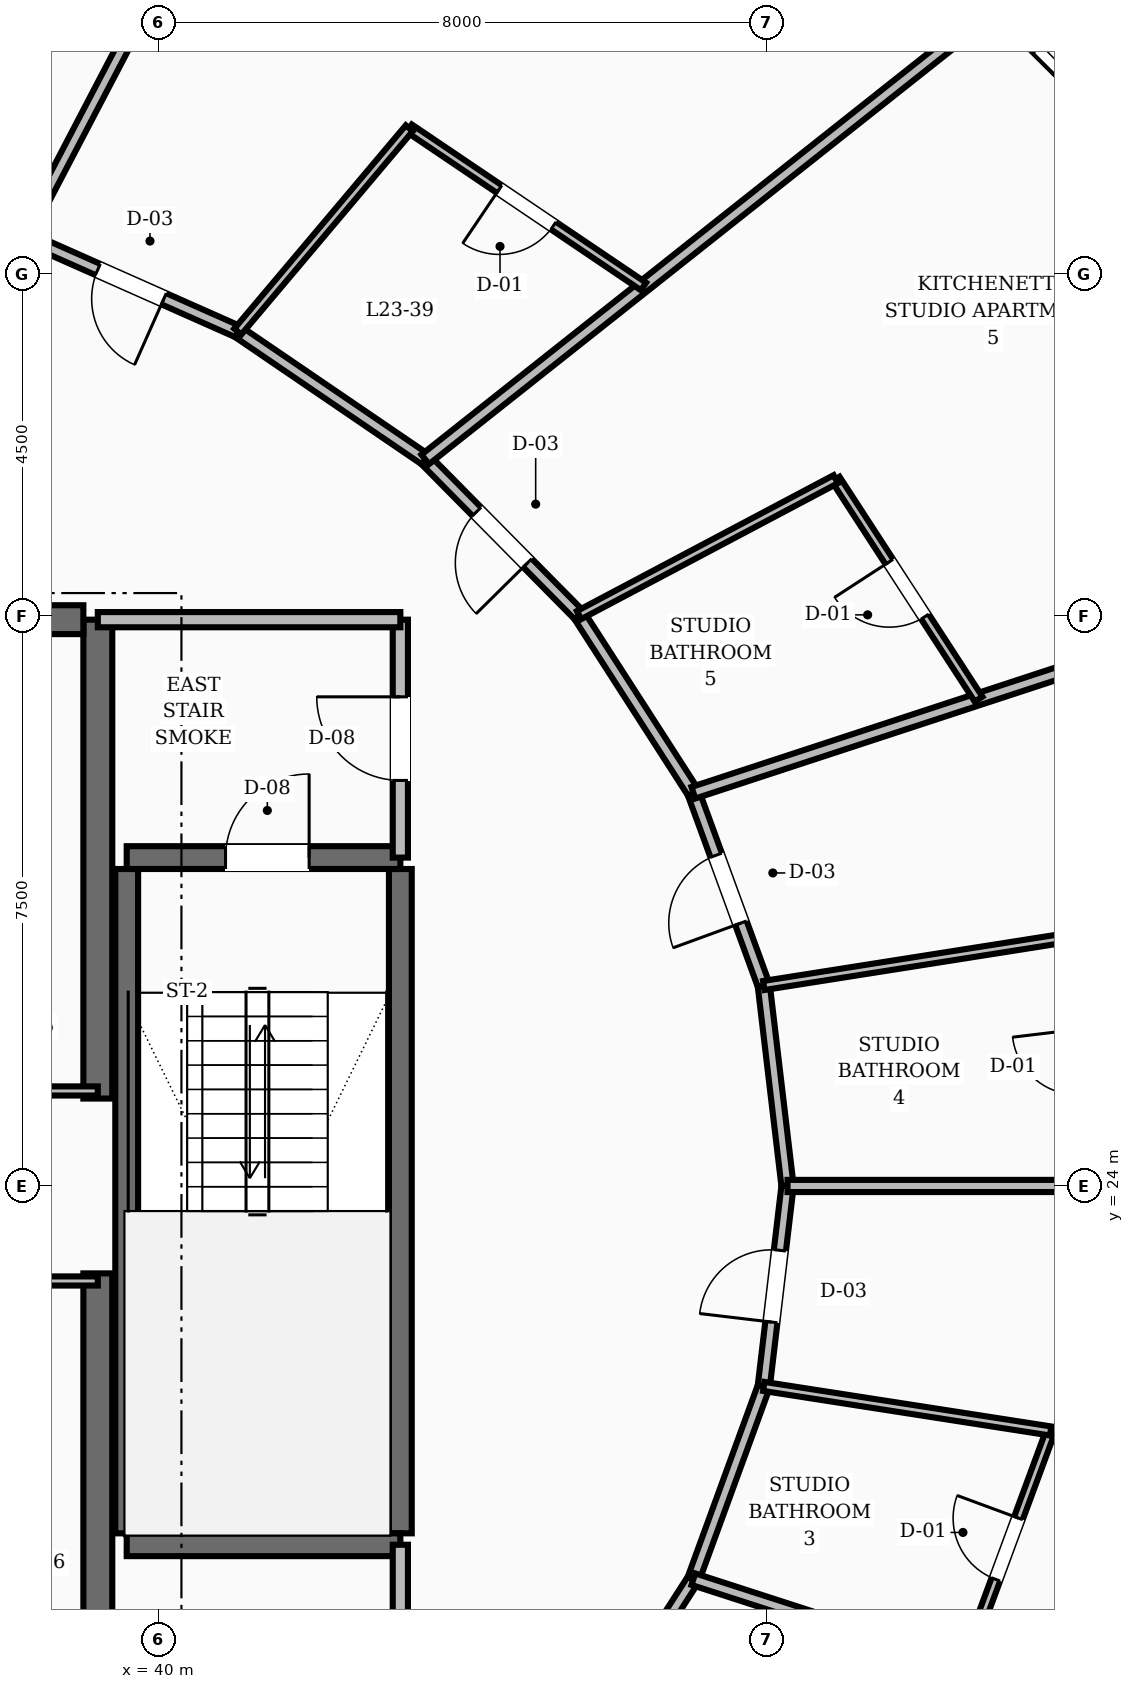
"""IFC4 building model, lengths in metres.
Left out: names, types, materials, properties, quantities, classifications, styles, units other than length and angle.
Written with IfcOpenShell. Run it as: python <this file> out.ifc"""

import sys

from ifc_helpers import new_model, si_unit, direction, frame, frame_2d, origin, place, context, subcontext, project, spatial, rectangle, extrude, element, fill, save


model = new_model("IFC4")
c1 = context("Model", 3, precision=1e-05, world=origin(), true_north=direction((0.0, 1.0)))
c2 = subcontext(c1, "Body", "Model", "MODEL_VIEW")
j1 = project(units=[si_unit("LENGTHUNIT", "METRE"), si_unit("PLANEANGLEUNIT", "RADIAN")], contexts=[c1])
p1 = place(None, origin())
s1 = spatial("IfcSite", under=j1, at=p1, CompositionType="ELEMENT")
p2 = place(p1, origin())
s2 = spatial("IfcBuilding", under=s1, at=p2, CompositionType="ELEMENT")
p3 = place(p2, frame((0.0, 0.0, 91.6)))
s3 = spatial("IfcBuildingStorey", under=s2, at=p3, CompositionType="ELEMENT", Elevation=91.6)
for number, where, z_axis, x_axis in (
    (1, (39.2, 16.55, 0.0), (0.0, 0.0, 1.0), (0.0, 1.0, 0.0)),
    (2, (39.2, 25.15, 0.0), (0.0, 0.0, 1.0), (0.0, 1.0, 0.0)),
):
    element("IfcWall", number, at=place(p3, frame(where, z_axis=z_axis, x_axis=x_axis)), inside=s3, PredefinedType="SHEAR", context=c2, shape_type="SweptSolid", body=[
        extrude(rectangle(XDim=6.3, YDim=0.38, at=frame_2d((3.15, 0.0))), origin(), (0.0, 0.0, 1.0), 3.6),
    ])
p4 = place(p3, frame((35.8, 31.45, 0.0), z_axis=(0.0, 0.0, 1.0), x_axis=(1.0, 0.0, 0.0)))
e3 = element("IfcWall", 3, at=p4, inside=s3, PredefinedType="SHEAR", context=c2, shape_type="SweptSolid", body=[
    extrude(rectangle(XDim=3.21, YDim=0.38, at=frame_2d((1.605, 0.0))), origin(), (0.0, 0.0, 1.0), 3.6),
])
p5 = place(p4, frame((0.3, 0.0, 0.0)))
e4 = element("IfcOpeningElement", 4, at=p5, cuts=e3, PredefinedType="OPENING", context=c2, shape_type="SweptSolid", body=[
    extrude(rectangle(XDim=1.1, YDim=2.1, at=frame_2d((0.55, 1.05))), frame((0.0, 0.2, 0.0), z_axis=(0.0, -1.0, 0.0), x_axis=(1.0, 0.0, 0.0)), (0.0, 0.0, 1.0), 0.4),
])
for number, where, z_axis, x_axis in (
    (5, (43.18, 19.43, 0.0), (0.0, 0.0, 1.0), (0.0, 1.0, 0.0)),
    (6, (39.58, 19.43, 0.0), (0.0, 0.0, 1.0), (0.0, 1.0, 0.0)),
):
    element("IfcWall", number, at=place(p3, frame(where, z_axis=z_axis, x_axis=x_axis)), inside=s3, PredefinedType="SHEAR", context=c2, shape_type="SweptSolid", body=[
        extrude(rectangle(XDim=8.74, YDim=0.3, at=frame_2d((4.37, 0.0))), origin(), (0.0, 0.0, 1.0), 3.6),
    ])
p6 = place(p3, frame((39.58, 19.28, 0.0), z_axis=(0.0, 0.0, 1.0), x_axis=(1.0, 0.0, 0.0)))
e7 = element("IfcWall", 7, at=p6, inside=s3, PredefinedType="SHEAR", context=c2, shape_type="SweptSolid", body=[
    extrude(rectangle(XDim=3.6, YDim=0.3, at=frame_2d((1.8, 0.0))), origin(), (0.0, 0.0, 1.0), 3.6),
])
p7 = place(p3, frame((39.58, 28.32, 0.0), z_axis=(0.0, 0.0, 1.0), x_axis=(1.0, 0.0, 0.0)))
e8 = element("IfcWall", 8, at=p7, inside=s3, PredefinedType="SHEAR", context=c2, shape_type="SweptSolid", body=[
    extrude(rectangle(XDim=3.6, YDim=0.3, at=frame_2d((1.8, 0.0))), origin(), (0.0, 0.0, 1.0), 3.6),
])
p8 = place(p7, frame((1.3, 0.0, 0.0)))
e9 = element("IfcOpeningElement", 9, at=p8, cuts=e8, PredefinedType="OPENING", context=c2, shape_type="SweptSolid", body=[
    extrude(rectangle(XDim=1.1, YDim=2.1, at=frame_2d((0.55, 1.05))), frame((0.0, 0.16, 0.0), z_axis=(0.0, -1.0, 0.0), x_axis=(1.0, 0.0, 0.0)), (0.0, 0.0, 1.0), 0.32),
])
p9 = place(p3, frame((54.418, 36.214, 0.0), z_axis=(0.0, 0.0, 1.0), x_axis=(-0.709375776042, 0.704830482006, 0.0)))
e10 = element("IfcWall", 10, at=p9, inside=s3, PredefinedType="STANDARD", context=c2, shape_type="SweptSolid", body=[
    extrude(rectangle(XDim=4.727, YDim=0.28, at=frame_2d((2.363, 0.0))), origin(), (0.0, 0.0, 1.0), 2.71),
])
p10 = place(p9, frame((0.763, 0.0, 0.8)))
e11 = element("IfcOpeningElement", 11, at=p10, cuts=e10, PredefinedType="OPENING", context=c2, shape_type="SweptSolid", body=[
    extrude(rectangle(XDim=3.2, YDim=1.65, at=frame_2d((1.6, 0.825))), frame((0.0, 0.15, 0.0), z_axis=(0.0, -1.0, 0.0), x_axis=(1.0, 0.0, 0.0)), (0.0, 0.0, 1.0), 0.3),
])
p11 = place(p3, frame((43.18, 28.32, 0.0), z_axis=(0.0, 0.0, 1.0), x_axis=(0.0, 1.0, 0.0)))
e12 = element("IfcWall", 12, at=p11, inside=s3, PredefinedType="SOLIDWALL", context=c2, shape_type="SweptSolid", body=[
    extrude(rectangle(XDim=3.13, YDim=0.2, at=frame_2d((1.565, 0.0))), origin(), (0.0, 0.0, 1.0), 2.71),
])
p12 = place(p11, frame((1.015, 0.0, 0.0)))
e13 = element("IfcOpeningElement", 13, at=p12, cuts=e12, PredefinedType="OPENING", context=c2, shape_type="SweptSolid", body=[
    extrude(rectangle(XDim=1.1, YDim=2.1, at=frame_2d((0.55, 1.05))), frame((0.0, 0.11, 0.0), z_axis=(0.0, -1.0, 0.0), x_axis=(1.0, 0.0, 0.0)), (0.0, 0.0, 1.0), 0.22),
])
p13 = place(p3, frame((39.2, 31.45, 0.0), z_axis=(0.0, 0.0, 1.0), x_axis=(1.0, 0.0, 0.0)))
e14 = element("IfcWall", 14, at=p13, inside=s3, PredefinedType="SOLIDWALL", context=c2, shape_type="SweptSolid", body=[
    extrude(rectangle(XDim=3.98, YDim=0.2, at=frame_2d((1.99, 0.0))), origin(), (0.0, 0.0, 1.0), 2.71),
])
p14 = place(p3, frame((43.18, 16.55, 0.0), z_axis=(0.0, 0.0, 1.0), x_axis=(0.0, 1.0, 0.0)))
e15 = element("IfcWall", 15, at=p14, inside=s3, PredefinedType="SOLIDWALL", context=c2, shape_type="SweptSolid", body=[
    extrude(rectangle(XDim=2.73, YDim=0.2, at=frame_2d((1.365, 0.0))), origin(), (0.0, 0.0, 1.0), 2.71),
])
p15 = place(p14, frame((0.89, 0.0, 0.0)))
e16 = element("IfcOpeningElement", 16, at=p15, cuts=e15, PredefinedType="OPENING", context=c2, shape_type="SweptSolid", body=[
    extrude(rectangle(XDim=0.95, YDim=2.1, at=frame_2d((0.475, 1.05))), frame((0.0, 0.11, 0.0), z_axis=(0.0, -1.0, 0.0), x_axis=(1.0, 0.0, 0.0)), (0.0, 0.0, 1.0), 0.22),
])
for number, where, z_axis, x_axis in (
    (17, (37.4, 25.25, 0.0), (0.0, 0.0, 1.0), (1.0, 0.0, 0.0)),
    (18, (37.4, 22.75, 0.0), (0.0, 0.0, 1.0), (1.0, 0.0, 0.0)),
):
    element("IfcWall", number, at=place(p3, frame(where, z_axis=z_axis, x_axis=x_axis)), inside=s3, PredefinedType="PARTITIONING", context=c2, shape_type="SweptSolid", body=[
        extrude(rectangle(XDim=1.8, YDim=0.12, at=frame_2d((0.9, 0.0))), origin(), (0.0, 0.0, 1.0), 2.71),
    ])
p16 = place(p3, frame((48.274, 24.0, 0.0), z_axis=(0.0, 0.0, 1.0), x_axis=(-0.117763961213, 0.99304161516, 0.0)))
e19 = element("IfcWall", 19, at=p16, inside=s3, PredefinedType="SOLIDWALL", context=c2, shape_type="SweptSolid", body=[
    extrude(rectangle(XDim=2.656, YDim=0.16, at=frame_2d((1.328, 0.0))), origin(), (0.0, 0.0, 1.0), 2.71),
])
p17 = place(p3, frame((47.961, 26.637, 0.0), z_axis=(0.0, 0.0, 1.0), x_axis=(-0.343013437329, 0.939330496583, 0.0)))
e20 = element("IfcWall", 20, at=p17, inside=s3, PredefinedType="SOLIDWALL", context=c2, shape_type="SweptSolid", body=[
    extrude(rectangle(XDim=2.7, YDim=0.16, at=frame_2d((1.35, 0.0))), origin(), (0.0, 0.0, 1.0), 2.71),
])
p18 = place(p17, frame((0.875, 0.0, 0.0)))
e21 = element("IfcOpeningElement", 21, at=p18, cuts=e20, PredefinedType="OPENING", context=c2, shape_type="SweptSolid", body=[
    extrude(rectangle(XDim=0.95, YDim=2.1, at=frame_2d((0.475, 1.05))), frame((0.0, 0.09, 0.0), z_axis=(0.0, -1.0, 0.0), x_axis=(1.0, 0.0, 0.0)), (0.0, 0.0, 1.0), 0.18),
])
p19 = place(p3, frame((47.035, 29.173, 0.0), z_axis=(0.0, 0.0, 1.0), x_axis=(-0.541126045017, 0.840941498206, 0.0)))
e22 = element("IfcWall", 22, at=p19, inside=s3, PredefinedType="SOLIDWALL", context=c2, shape_type="SweptSolid", body=[
    extrude(rectangle(XDim=2.779, YDim=0.16, at=frame_2d((1.39, 0.0))), origin(), (0.0, 0.0, 1.0), 2.71),
])
p20 = place(p3, frame((45.531, 31.51, 0.0), z_axis=(0.0, 0.0, 1.0), x_axis=(-0.702811997, 0.711375636969, 0.0)))
e23 = element("IfcWall", 23, at=p20, inside=s3, PredefinedType="SOLIDWALL", context=c2, shape_type="SweptSolid", body=[
    extrude(rectangle(XDim=2.879, YDim=0.16, at=frame_2d((1.44, 0.0))), origin(), (0.0, 0.0, 1.0), 2.71),
])
p21 = place(p20, frame((0.965, 0.0, 0.0)))
e24 = element("IfcOpeningElement", 24, at=p21, cuts=e23, PredefinedType="OPENING", context=c2, shape_type="SweptSolid", body=[
    extrude(rectangle(XDim=0.95, YDim=2.1, at=frame_2d((0.475, 1.05))), frame((0.0, 0.09, 0.0), z_axis=(0.0, -1.0, 0.0), x_axis=(1.0, 0.0, 0.0)), (0.0, 0.0, 1.0), 0.18),
])
p22 = place(p3, frame((43.508, 33.559, 0.0), z_axis=(0.0, 0.0, 1.0), x_axis=(-0.826293096206, 0.56324037423, 0.0)))
e25 = element("IfcWall", 25, at=p22, inside=s3, PredefinedType="SOLIDWALL", context=c2, shape_type="SweptSolid", body=[
    extrude(rectangle(XDim=2.985, YDim=0.16, at=frame_2d((1.492, 0.0))), origin(), (0.0, 0.0, 1.0), 2.71),
])
p23 = place(p3, frame((41.041, 35.24, 0.0), z_axis=(0.0, 0.0, 1.0), x_axis=(-0.913952123493, 0.405822024984, 0.0)))
e26 = element("IfcWall", 26, at=p23, inside=s3, PredefinedType="SOLIDWALL", context=c2, shape_type="SweptSolid", body=[
    extrude(rectangle(XDim=3.078, YDim=0.16, at=frame_2d((1.539, 0.0))), origin(), (0.0, 0.0, 1.0), 2.71),
])
p24 = place(p23, frame((1.064, 0.0, 0.0)))
e27 = element("IfcOpeningElement", 27, at=p24, cuts=e26, PredefinedType="OPENING", context=c2, shape_type="SweptSolid", body=[
    extrude(rectangle(XDim=0.95, YDim=2.1, at=frame_2d((0.475, 1.05))), frame((0.0, 0.09, 0.0), z_axis=(0.0, -1.0, 0.0), x_axis=(1.0, 0.0, 0.0)), (0.0, 0.0, 1.0), 0.18),
])
p25 = place(p3, frame((45.531, 16.49, 0.0), z_axis=(0.0, 0.0, 1.0), x_axis=(0.541126045017, 0.840941498206, 0.0)))
e28 = element("IfcWall", 28, at=p25, inside=s3, PredefinedType="SOLIDWALL", context=c2, shape_type="SweptSolid", body=[
    extrude(rectangle(XDim=2.779, YDim=0.16, at=frame_2d((1.39, 0.0))), origin(), (0.0, 0.0, 1.0), 2.71),
])
p26 = place(p25, frame((0.915, 0.0, 0.0)))
e29 = element("IfcOpeningElement", 29, at=p26, cuts=e28, PredefinedType="OPENING", context=c2, shape_type="SweptSolid", body=[
    extrude(rectangle(XDim=0.95, YDim=2.1, at=frame_2d((0.475, 1.05))), frame((0.0, 0.09, 0.0), z_axis=(0.0, -1.0, 0.0), x_axis=(1.0, 0.0, 0.0)), (0.0, 0.0, 1.0), 0.18),
])
p27 = place(p3, frame((47.035, 18.827, 0.0), z_axis=(0.0, 0.0, 1.0), x_axis=(0.343013437329, 0.939330496583, 0.0)))
e30 = element("IfcWall", 30, at=p27, inside=s3, PredefinedType="SOLIDWALL", context=c2, shape_type="SweptSolid", body=[
    extrude(rectangle(XDim=2.7, YDim=0.16, at=frame_2d((1.35, 0.0))), origin(), (0.0, 0.0, 1.0), 2.71),
])
p28 = place(p3, frame((47.961, 21.363, 0.0), z_axis=(0.0, 0.0, 1.0), x_axis=(0.117763961213, 0.99304161516, 0.0)))
e31 = element("IfcWall", 31, at=p28, inside=s3, PredefinedType="SOLIDWALL", context=c2, shape_type="SweptSolid", body=[
    extrude(rectangle(XDim=2.656, YDim=0.16, at=frame_2d((1.328, 0.0))), origin(), (0.0, 0.0, 1.0), 2.71),
])
p29 = place(p28, frame((0.853, 0.0, 0.0)))
e32 = element("IfcOpeningElement", 32, at=p29, cuts=e31, PredefinedType="OPENING", context=c2, shape_type="SweptSolid", body=[
    extrude(rectangle(XDim=0.95, YDim=2.1, at=frame_2d((0.475, 1.05))), frame((0.0, 0.09, 0.0), z_axis=(0.0, -1.0, 0.0), x_axis=(1.0, 0.0, 0.0)), (0.0, 0.0, 1.0), 0.18),
])
p30 = place(p3, frame((47.035, 18.827, 0.0), z_axis=(0.0, 0.0, 1.0), x_axis=(0.951482342418, -0.307703350757, 0.0)))
e33 = element("IfcWall", 33, at=p30, inside=s3, PredefinedType="SOLIDWALL", context=c2, shape_type="SweptSolid", body=[
    extrude(rectangle(XDim=9.784, YDim=0.16, at=frame_2d((4.892, 0.0))), origin(), (0.0, 0.0, 1.0), 2.71),
])
p31 = place(p3, frame((50.591, 17.677, 0.0), z_axis=(0.0, 0.0, 1.0), x_axis=(0.346520124716, 0.938042538037, 0.0)))
e34 = element("IfcWall", 34, at=p31, inside=s3, PredefinedType="PARTITIONING", context=c2, shape_type="SweptSolid", body=[
    extrude(rectangle(XDim=3.304, YDim=0.12, at=frame_2d((1.652, 0.0))), origin(), (0.0, 0.0, 1.0), 2.71),
])
p32 = place(p31, frame((1.222, 0.0, 0.0)))
e35 = element("IfcOpeningElement", 35, at=p32, cuts=e34, PredefinedType="OPENING", context=c2, shape_type="SweptSolid", body=[
    extrude(rectangle(XDim=0.86, YDim=2.1, at=frame_2d((0.43, 1.05))), frame((0.0, 0.07, 0.0), z_axis=(0.0, -1.0, 0.0), x_axis=(1.0, 0.0, 0.0)), (0.0, 0.0, 1.0), 0.14),
])
p33 = place(p3, frame((47.961, 21.363, 0.0), z_axis=(0.0, 0.0, 1.0), x_axis=(0.988155696558, -0.153454616612, 0.0)))
e36 = element("IfcWall", 36, at=p33, inside=s3, PredefinedType="PARTITIONING", context=c2, shape_type="SweptSolid", body=[
    extrude(rectangle(XDim=3.82, YDim=0.12, at=frame_2d((1.91, 0.0))), origin(), (0.0, 0.0, 1.0), 2.71),
])
p34 = place(p3, frame((48.274, 24.0, 0.0), z_axis=(0.0, 0.0, 1.0), x_axis=(1.0, 0.0, 0.0)))
e37 = element("IfcWall", 37, at=p34, inside=s3, PredefinedType="SOLIDWALL", context=c2, shape_type="SweptSolid", body=[
    extrude(rectangle(XDim=10.638, YDim=0.16, at=frame_2d((5.319, 0.0))), origin(), (0.0, 0.0, 1.0), 2.71),
])
p35 = place(p3, frame((47.961, 26.637, 0.0), z_axis=(0.0, 0.0, 1.0), x_axis=(0.987811515009, 0.155654780895, 0.0)))
e38 = element("IfcWall", 38, at=p35, inside=s3, PredefinedType="PARTITIONING", context=c2, shape_type="SweptSolid", body=[
    extrude(rectangle(XDim=4.032, YDim=0.12, at=frame_2d((2.016, 0.0))), origin(), (0.0, 0.0, 1.0), 2.71),
])
p36 = place(p3, frame((47.035, 29.173, 0.0), z_axis=(0.0, 0.0, 1.0), x_axis=(0.950150689475, 0.311791063518, 0.0)))
e39 = element("IfcWall", 39, at=p36, inside=s3, PredefinedType="SOLIDWALL", context=c2, shape_type="SweptSolid", body=[
    extrude(rectangle(XDim=10.342, YDim=0.16, at=frame_2d((5.171, 0.0))), origin(), (0.0, 0.0, 1.0), 2.71),
])
p37 = place(p3, frame((50.787, 30.404, 0.0), z_axis=(0.0, 0.0, 1.0), x_axis=(-0.544682368389, 0.838642425332, 0.0)))
e40 = element("IfcWall", 40, at=p37, inside=s3, PredefinedType="PARTITIONING", context=c2, shape_type="SweptSolid", body=[
    extrude(rectangle(XDim=3.45, YDim=0.12, at=frame_2d((1.725, 0.0))), origin(), (0.0, 0.0, 1.0), 2.71),
])
p38 = place(p37, frame((1.295, 0.0, 0.0)))
e41 = element("IfcOpeningElement", 41, at=p38, cuts=e40, PredefinedType="OPENING", context=c2, shape_type="SweptSolid", body=[
    extrude(rectangle(XDim=0.86, YDim=2.1, at=frame_2d((0.43, 1.05))), frame((0.0, 0.07, 0.0), z_axis=(0.0, -1.0, 0.0), x_axis=(1.0, 0.0, 0.0)), (0.0, 0.0, 1.0), 0.14),
])
p39 = place(p3, frame((45.531, 31.51, 0.0), z_axis=(0.0, 0.0, 1.0), x_axis=(0.88383609415, 0.46779670657, 0.0)))
e42 = element("IfcWall", 42, at=p39, inside=s3, PredefinedType="PARTITIONING", context=c2, shape_type="SweptSolid", body=[
    extrude(rectangle(XDim=3.821, YDim=0.12, at=frame_2d((1.91, 0.0))), origin(), (0.0, 0.0, 1.0), 2.71),
])
p40 = place(p3, frame((43.508, 33.559, 0.0), z_axis=(0.0, 0.0, 1.0), x_axis=(0.783820213827, 0.620987819846, 0.0)))
e43 = element("IfcWall", 43, at=p40, inside=s3, PredefinedType="SOLIDWALL", context=c2, shape_type="SweptSolid", body=[
    extrude(rectangle(XDim=9.591, YDim=0.16, at=frame_2d((4.796, 0.0))), origin(), (0.0, 0.0, 1.0), 2.71),
])
p41 = place(p3, frame((46.379, 35.834, 0.0), z_axis=(0.0, 0.0, 1.0), x_axis=(-0.828691848629, 0.559705118805, 0.0)))
e44 = element("IfcWall", 44, at=p41, inside=s3, PredefinedType="PARTITIONING", context=c2, shape_type="SweptSolid", body=[
    extrude(rectangle(XDim=3.719, YDim=0.12, at=frame_2d((1.859, 0.0))), origin(), (0.0, 0.0, 1.0), 2.71),
])
p42 = place(p41, frame((1.429, 0.0, 0.0)))
e45 = element("IfcOpeningElement", 45, at=p42, cuts=e44, PredefinedType="OPENING", context=c2, shape_type="SweptSolid", body=[
    extrude(rectangle(XDim=0.86, YDim=2.1, at=frame_2d((0.43, 1.05))), frame((0.0, 0.07, 0.0), z_axis=(0.0, -1.0, 0.0), x_axis=(1.0, 0.0, 0.0)), (0.0, 0.0, 1.0), 0.14),
])
p43 = place(p3, frame((41.041, 35.24, 0.0), z_axis=(0.0, 0.0, 1.0), x_axis=(0.644715569152, 0.764422549964, 0.0)))
e46 = element("IfcWall", 46, at=p43, inside=s3, PredefinedType="PARTITIONING", context=c2, shape_type="SweptSolid", body=[
    extrude(rectangle(XDim=3.5, YDim=0.12, at=frame_2d((1.75, 0.0))), origin(), (0.0, 0.0, 1.0), 2.71),
])
p44 = place(p3, frame((38.228, 36.489, 0.0), z_axis=(0.0, 0.0, 1.0), x_axis=(0.463329180803, 0.886186250297, 0.0)))
e47 = element("IfcWall", 47, at=p44, inside=s3, PredefinedType="SOLIDWALL", context=c2, shape_type="SweptSolid", body=[
    extrude(rectangle(XDim=8.777, YDim=0.16, at=frame_2d((4.389, 0.0))), origin(), (0.0, 0.0, 1.0), 2.71),
])
p45 = place(p10, origin())
e48 = element("IfcWindow", 48, at=p45, inside=s3, PartitioningType="SINGLE_PANEL", PredefinedType="WINDOW", context=c2, shape_type="SweptSolid", body=[
    extrude(rectangle(XDim=3.2, YDim=1.65, at=frame_2d((1.6, 0.825))), frame((0.0, 0.03, 0.0), z_axis=(0.0, -1.0, 0.0), x_axis=(1.0, 0.0, 0.0)), (0.0, 0.0, 1.0), 0.06),
])
fill(e11, e48)
p46 = place(p8, origin())
e49 = element("IfcDoor", 49, at=p46, inside=s3, OperationType="SINGLE_SWING_RIGHT", PredefinedType="DOOR", context=c2, shape_type="SweptSolid", body=[
    extrude(rectangle(XDim=1.1, YDim=2.1, at=frame_2d((0.55, 1.05))), frame((0.0, 0.025, 0.0), z_axis=(0.0, -1.0, 0.0), x_axis=(1.0, 0.0, 0.0)), (0.0, 0.0, 1.0), 0.05),
])
fill(e9, e49)
p47 = place(p12, origin())
e50 = element("IfcDoor", 50, at=p47, inside=s3, OperationType="SINGLE_SWING_RIGHT", PredefinedType="DOOR", context=c2, shape_type="SweptSolid", body=[
    extrude(rectangle(XDim=1.1, YDim=2.1, at=frame_2d((0.55, 1.05))), frame((0.0, 0.025, 0.0), z_axis=(0.0, -1.0, 0.0), x_axis=(1.0, 0.0, 0.0)), (0.0, 0.0, 1.0), 0.05),
])
fill(e13, e50)
p48 = place(p32, origin())
e51 = element("IfcDoor", 51, at=p48, inside=s3, OperationType="SINGLE_SWING_RIGHT", PredefinedType="DOOR", context=c2, shape_type="SweptSolid", body=[
    extrude(rectangle(XDim=0.86, YDim=2.1, at=frame_2d((0.43, 1.05))), frame((0.0, 0.025, 0.0), z_axis=(0.0, -1.0, 0.0), x_axis=(1.0, 0.0, 0.0)), (0.0, 0.0, 1.0), 0.05),
])
fill(e35, e51)
p49 = place(p29, origin())
e52 = element("IfcDoor", 52, at=p49, inside=s3, OperationType="SINGLE_SWING_LEFT", PredefinedType="DOOR", context=c2, shape_type="SweptSolid", body=[
    extrude(rectangle(XDim=0.95, YDim=2.1, at=frame_2d((0.475, 1.05))), frame((0.0, 0.025, 0.0), z_axis=(0.0, -1.0, 0.0), x_axis=(1.0, 0.0, 0.0)), (0.0, 0.0, 1.0), 0.05),
])
fill(e32, e52)
p50 = place(p18, origin())
e53 = element("IfcDoor", 53, at=p50, inside=s3, OperationType="SINGLE_SWING_LEFT", PredefinedType="DOOR", context=c2, shape_type="SweptSolid", body=[
    extrude(rectangle(XDim=0.95, YDim=2.1, at=frame_2d((0.475, 1.05))), frame((0.0, 0.025, 0.0), z_axis=(0.0, -1.0, 0.0), x_axis=(1.0, 0.0, 0.0)), (0.0, 0.0, 1.0), 0.05),
])
fill(e21, e53)
p51 = place(p38, origin())
e54 = element("IfcDoor", 54, at=p51, inside=s3, OperationType="SINGLE_SWING_RIGHT", PredefinedType="DOOR", context=c2, shape_type="SweptSolid", body=[
    extrude(rectangle(XDim=0.86, YDim=2.1, at=frame_2d((0.43, 1.05))), frame((0.0, 0.025, 0.0), z_axis=(0.0, -1.0, 0.0), x_axis=(1.0, 0.0, 0.0)), (0.0, 0.0, 1.0), 0.05),
])
fill(e41, e54)
p52 = place(p21, origin())
e55 = element("IfcDoor", 55, at=p52, inside=s3, OperationType="SINGLE_SWING_LEFT", PredefinedType="DOOR", context=c2, shape_type="SweptSolid", body=[
    extrude(rectangle(XDim=0.95, YDim=2.1, at=frame_2d((0.475, 1.05))), frame((0.0, 0.025, 0.0), z_axis=(0.0, -1.0, 0.0), x_axis=(1.0, 0.0, 0.0)), (0.0, 0.0, 1.0), 0.05),
])
fill(e24, e55)
p53 = place(p42, origin())
e56 = element("IfcDoor", 56, at=p53, inside=s3, OperationType="SINGLE_SWING_RIGHT", PredefinedType="DOOR", context=c2, shape_type="SweptSolid", body=[
    extrude(rectangle(XDim=0.86, YDim=2.1, at=frame_2d((0.43, 1.05))), frame((0.0, 0.025, 0.0), z_axis=(0.0, -1.0, 0.0), x_axis=(1.0, 0.0, 0.0)), (0.0, 0.0, 1.0), 0.05),
])
fill(e45, e56)
p54 = place(p24, origin())
e57 = element("IfcDoor", 57, at=p54, inside=s3, OperationType="SINGLE_SWING_LEFT", PredefinedType="DOOR", context=c2, shape_type="SweptSolid", body=[
    extrude(rectangle(XDim=0.95, YDim=2.1, at=frame_2d((0.475, 1.05))), frame((0.0, 0.025, 0.0), z_axis=(0.0, -1.0, 0.0), x_axis=(1.0, 0.0, 0.0)), (0.0, 0.0, 1.0), 0.05),
])
fill(e27, e57)
save(model, sys.argv[1])
